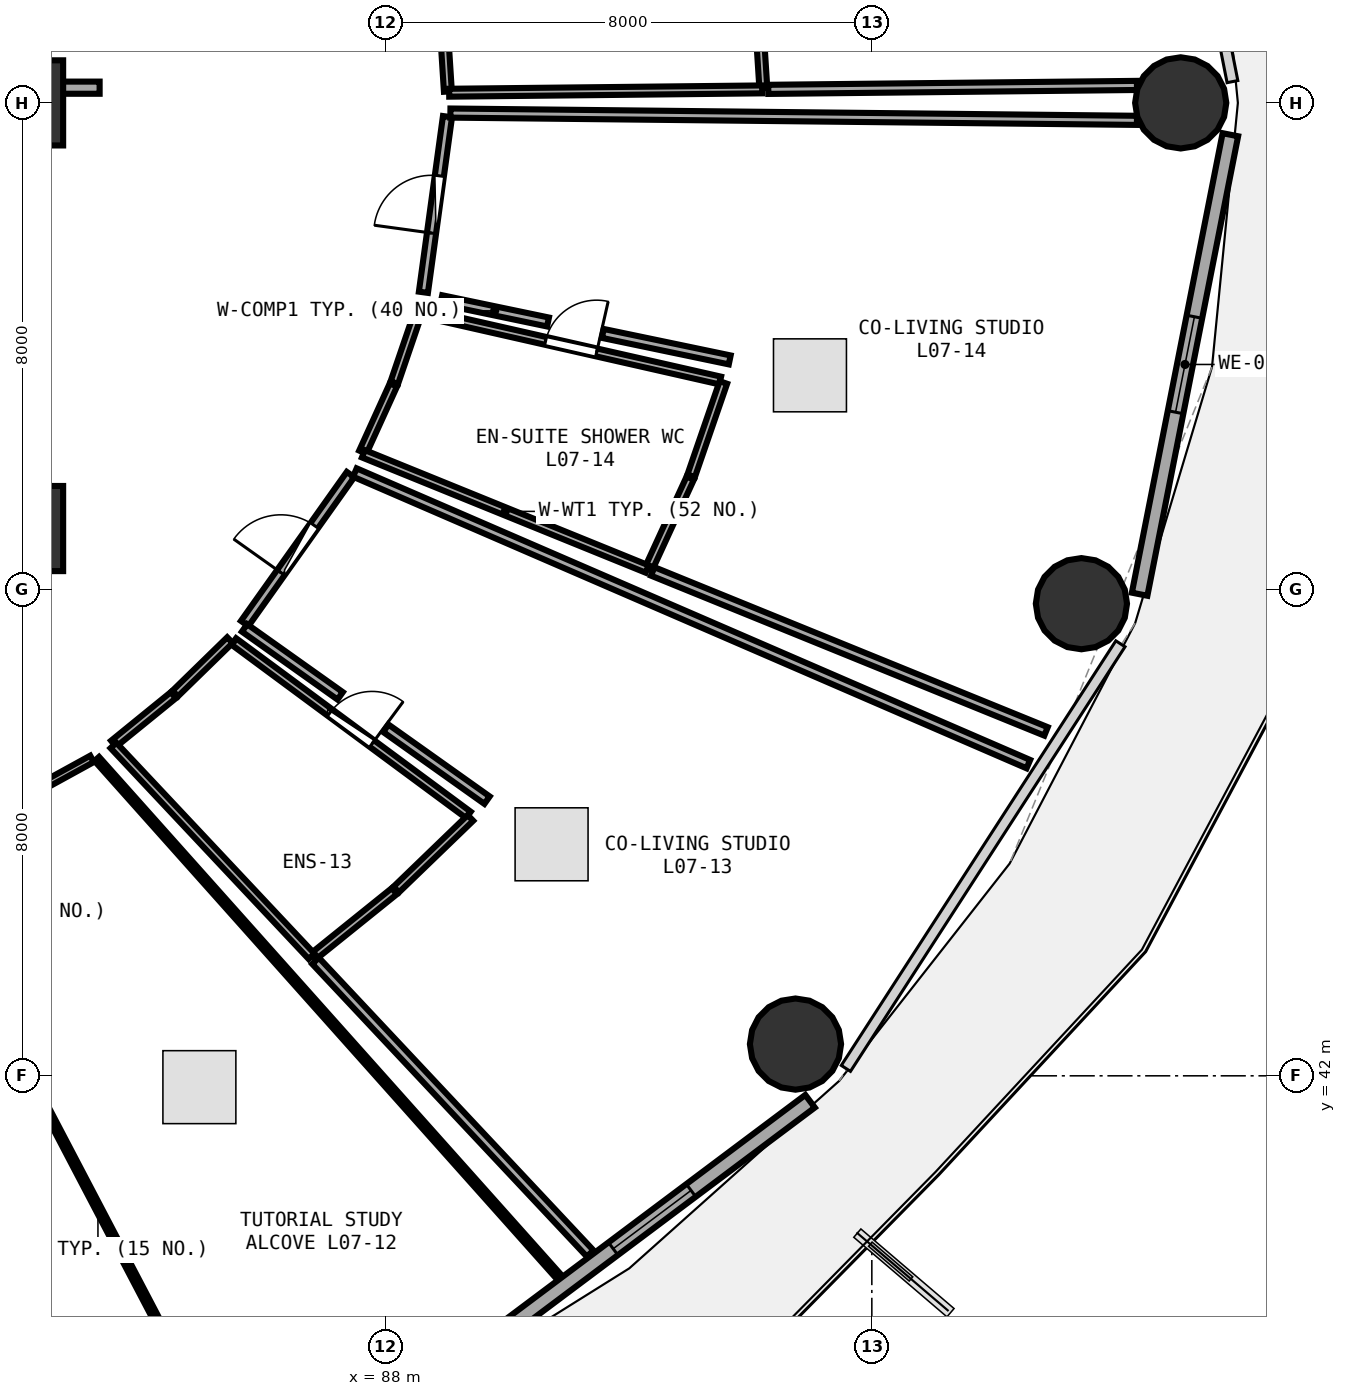
"""IFC4 building model, lengths in metres.
Left out: names, types, materials, properties, quantities, classifications, styles, units other than length and angle.
Written with IfcOpenShell. Run it as: python <this file> out.ifc"""

import sys

from ifc_helpers import new_model, si_unit, direction, frame, frame_2d, origin, origin_2d, place, context, subcontext, project, spatial, rectangle, circle, extrude, element, fill, save


model = new_model("IFC4")
c1 = context("Model", 3, precision=1e-05, world=origin(), true_north=direction((0.0, 1.0)))
c2 = subcontext(c1, "Body", "Model", "MODEL_VIEW")
j1 = project(units=[si_unit("LENGTHUNIT", "METRE"), si_unit("PLANEANGLEUNIT", "RADIAN")], contexts=[c1])
p1 = place(None, origin())
s1 = spatial("IfcSite", under=j1, at=p1, CompositionType="ELEMENT")
p2 = place(p1, origin())
s2 = spatial("IfcBuilding", under=s1, at=p2, CompositionType="ELEMENT")
p3 = place(p2, frame((0.0, 0.0, 30.0)))
s3 = spatial("IfcBuildingStorey", under=s2, at=p3, CompositionType="ELEMENT", Elevation=30.0)
for number, where, z_axis, x_axis in (
    (1, (82.0, 51.0, 0.0), (0.0, 0.0, 1.0), (1.0, 0.0, 0.0)),
    (2, (82.0, 58.0, 0.0), (0.0, 0.0, 1.0), (1.0, 0.0, 0.0)),
):
    element("IfcColumn", number, at=place(p3, frame(where, z_axis=z_axis, x_axis=x_axis)), inside=s3, PredefinedType="PILASTER", context=c2, shape_type="SweptSolid", body=[
        extrude(rectangle(XDim=1.4, YDim=1.4, at=origin_2d()), origin(), (0.0, 0.0, 1.0), 3.75),
    ])
for number, where, z_axis, x_axis in (
    (3, (101.08, 58.0, 0.0), (0.0, 0.0, 1.0), (1.0, 0.0, 0.0)),
    (4, (94.744, 42.522, 0.0), (0.0, 0.0, 1.0), (1.0, 0.0, 0.0)),
    (5, (99.447, 49.764, 0.0), (0.0, 0.0, 1.0), (1.0, 0.0, 0.0)),
):
    element("IfcColumn", number, at=place(p3, frame(where, z_axis=z_axis, x_axis=x_axis)), inside=s3, PredefinedType="COLUMN", context=c2, shape_type="SweptSolid", body=[
        extrude(circle(Radius=0.75, at=origin_2d()), origin(), (0.0, 0.0, 1.0), 3.75),
    ])
p4 = place(p3, frame((88.349, 36.611, 0.0), z_axis=(0.0, 0.0, 1.0), x_axis=(0.80030733173, 0.599590005569, 0.0)))
e6 = element("IfcWall", 6, at=p4, inside=s3, PredefinedType="SOLIDWALL", context=c2, shape_type="SweptSolid", body=[
    extrude(rectangle(XDim=8.291, YDim=0.26, at=frame_2d((4.145, 0.0))), origin(), (0.0, 0.0, 1.0), 3.475),
])
p5 = place(p4, frame((4.245, 0.0, 0.85)))
e7 = element("IfcOpeningElement", 7, at=p5, cuts=e6, PredefinedType="OPENING", context=c2, shape_type="SweptSolid", body=[
    extrude(rectangle(XDim=1.6, YDim=1.45, at=frame_2d((0.8, 0.725))), frame((0.0, 0.14, 0.0), z_axis=(0.0, -1.0, 0.0), x_axis=(1.0, 0.0, 0.0)), (0.0, 0.0, 1.0), 0.28),
])
p6 = place(p3, frame((100.404, 49.92, 0.0), z_axis=(0.0, 0.0, 1.0), x_axis=(0.193726159581, 0.98105564322, 0.0)))
e8 = element("IfcWall", 8, at=p6, inside=s3, PredefinedType="SOLIDWALL", context=c2, shape_type="SweptSolid", body=[
    extrude(rectangle(XDim=7.703, YDim=0.26, at=frame_2d((3.851, 0.0))), origin(), (0.0, 0.0, 1.0), 3.475),
])
p7 = place(p6, frame((3.051, 0.0, 0.85)))
e9 = element("IfcOpeningElement", 9, at=p7, cuts=e8, PredefinedType="OPENING", context=c2, shape_type="SweptSolid", body=[
    extrude(rectangle(XDim=1.6, YDim=1.45, at=frame_2d((0.8, 0.725))), frame((0.0, 0.14, 0.0), z_axis=(0.0, -1.0, 0.0), x_axis=(1.0, 0.0, 0.0)), (0.0, 0.0, 1.0), 0.28),
])
p8 = place(p3, frame((79.3, 58.25, 0.0), z_axis=(0.0, 0.0, 1.0), x_axis=(1.0, 0.0, 0.0)))
e10 = element("IfcWall", 10, at=p8, inside=s3, PredefinedType="SOLIDWALL", context=c2, shape_type="SweptSolid", body=[
    extrude(rectangle(XDim=4.0, YDim=0.2, at=frame_2d((2.0, 0.0))), origin(), (0.0, 0.0, 1.0), 2.775),
])
p9 = place(p8, frame((0.5, 0.0, 0.0)))
e11 = element("IfcOpeningElement", 11, at=p9, cuts=e10, PredefinedType="OPENING", context=c2, shape_type="SweptSolid", body=[
    extrude(rectangle(XDim=1.1, YDim=2.1, at=frame_2d((0.55, 1.05))), frame((0.0, 0.11, 0.0), z_axis=(0.0, -1.0, 0.0), x_axis=(1.0, 0.0, 0.0)), (0.0, 0.0, 1.0), 0.22),
])
p10 = place(p3, frame((80.299, 45.632, 0.0), z_axis=(0.0, 0.0, 1.0), x_axis=(0.876387079092, 0.481607399861, 0.0)))
e12 = element("IfcWall", 12, at=p10, inside=s3, PredefinedType="PARTITIONING", context=c2, shape_type="SweptSolid", body=[
    extrude(rectangle(XDim=3.281, YDim=0.12, at=frame_2d((1.641, 0.0))), origin(), (0.0, 0.0, 1.0), 2.875),
])
p11 = place(p10, frame((1.191, 0.0, 0.0)))
e13 = element("IfcOpeningElement", 13, at=p11, cuts=e12, PredefinedType="OPENING", context=c2, shape_type="SweptSolid", body=[
    extrude(rectangle(XDim=0.9, YDim=2.08, at=frame_2d((0.45, 1.04))), frame((0.0, 0.07, 0.0), z_axis=(0.0, -1.0, 0.0), x_axis=(1.0, 0.0, 0.0)), (0.0, 0.0, 1.0), 0.14),
])
p12 = place(p3, frame((85.506, 49.143, 0.0), z_axis=(0.0, 0.0, 1.0), x_axis=(0.80412644244, -0.594458295063, 0.0)))
e14 = element("IfcWall", 14, at=p12, inside=s3, PredefinedType="PLUMBINGWALL", context=c2, shape_type="SweptSolid", body=[
    extrude(rectangle(XDim=4.799, YDim=0.13, at=frame_2d((2.399, 0.0))), origin(), (0.0, 0.0, 1.0), 2.875),
])
p13 = place(p12, frame((1.969, 0.0, 0.0)))
e15 = element("IfcOpeningElement", 15, at=p13, cuts=e14, PredefinedType="OPENING", context=c2, shape_type="SweptSolid", body=[
    extrude(rectangle(XDim=0.86, YDim=2.05, at=frame_2d((0.43, 1.025))), frame((0.0, 0.075, 0.0), z_axis=(0.0, -1.0, 0.0), x_axis=(1.0, 0.0, 0.0)), (0.0, 0.0, 1.0), 0.15),
])
p14 = place(p3, frame((85.686, 49.438, 0.0), z_axis=(0.0, 0.0, 1.0), x_axis=(0.579107689823, 0.815251055557, 0.0)))
e16 = element("IfcWall", 16, at=p14, inside=s3, PredefinedType="PARTITIONING", context=c2, shape_type="SweptSolid", body=[
    extrude(rectangle(XDim=3.005, YDim=0.15, at=frame_2d((1.503, 0.0))), origin(), (0.0, 0.0, 1.0), 2.875),
])
p15 = place(p14, frame((1.028, 0.0, 0.0)))
e17 = element("IfcOpeningElement", 17, at=p15, cuts=e16, PredefinedType="OPENING", context=c2, shape_type="SweptSolid", body=[
    extrude(rectangle(XDim=0.95, YDim=2.08, at=frame_2d((0.475, 1.04))), frame((0.0, 0.085, 0.0), z_axis=(0.0, -1.0, 0.0), x_axis=(1.0, 0.0, 0.0)), (0.0, 0.0, 1.0), 0.17),
])
p16 = place(p3, frame((88.603, 54.548, 0.0), z_axis=(0.0, 0.0, 1.0), x_axis=(0.975187669184, -0.221379786503, 0.0)))
e18 = element("IfcWall", 18, at=p16, inside=s3, PredefinedType="PLUMBINGWALL", context=c2, shape_type="SweptSolid", body=[
    extrude(rectangle(XDim=5.029, YDim=0.13, at=frame_2d((2.514, 0.0))), origin(), (0.0, 0.0, 1.0), 3.175),
])
p17 = place(p16, frame((2.084, 0.0, 0.0)))
e19 = element("IfcOpeningElement", 19, at=p17, cuts=e18, PredefinedType="OPENING", context=c2, shape_type="SweptSolid", body=[
    extrude(rectangle(XDim=0.86, YDim=2.05, at=frame_2d((0.43, 1.025))), frame((0.0, 0.075, 0.0), z_axis=(0.0, -1.0, 0.0), x_axis=(1.0, 0.0, 0.0)), (0.0, 0.0, 1.0), 0.15),
])
p18 = place(p3, frame((88.625, 54.885, 0.0), z_axis=(0.0, 0.0, 1.0), x_axis=(0.135838186105, 0.990731036758, 0.0)))
e20 = element("IfcWall", 20, at=p18, inside=s3, PredefinedType="PARTITIONING", context=c2, shape_type="SweptSolid", body=[
    extrude(rectangle(XDim=2.915, YDim=0.15, at=frame_2d((1.458, 0.0))), origin(), (0.0, 0.0, 1.0), 3.48),
])
p19 = place(p18, frame((0.983, 0.0, 0.0)))
e21 = element("IfcOpeningElement", 21, at=p19, cuts=e20, PredefinedType="OPENING", context=c2, shape_type="SweptSolid", body=[
    extrude(rectangle(XDim=0.95, YDim=2.08, at=frame_2d((0.475, 1.04))), frame((0.0, 0.085, 0.0), z_axis=(0.0, -1.0, 0.0), x_axis=(1.0, 0.0, 0.0)), (0.0, 0.0, 1.0), 0.17),
])
p20 = place(p3, frame((89.028, 58.187, 0.0), z_axis=(0.0, 0.0, 1.0), x_axis=(-0.063661240763, 0.99797156594, 0.0)))
e22 = element("IfcWall", 22, at=p20, inside=s3, PredefinedType="PLUMBINGWALL", context=c2, shape_type="SweptSolid", body=[
    extrude(rectangle(XDim=1.197, YDim=0.13, at=frame_2d((0.598, 0.0))), origin(), (0.0, 0.0, 1.0), 2.875),
])
p21 = place(p3, frame((94.113, 59.845, 0.0), z_axis=(0.0, 0.0, 1.0), x_axis=(0.06383542257, -0.997960439509, 0.0)))
e23 = element("IfcWall", 23, at=p21, inside=s3, PredefinedType="PLUMBINGWALL", context=c2, shape_type="SweptSolid", body=[
    extrude(rectangle(XDim=1.606, YDim=0.13, at=frame_2d((0.803, 0.0))), origin(), (0.0, 0.0, 1.0), 3.48),
])
p22 = place(p3, frame((94.197, 58.222, 0.0), z_axis=(0.0, 0.0, 1.0), x_axis=(-0.999944081579, -0.010575146078, 0.0)))
e24 = element("IfcWall", 24, at=p22, inside=s3, PredefinedType="PLUMBINGWALL", context=c2, shape_type="SweptSolid", body=[
    extrude(rectangle(XDim=5.148, YDim=0.13, at=frame_2d((2.574, 0.0))), origin(), (0.0, 0.0, 1.0), 2.875),
])
p23 = place(p3, frame((100.36, 58.287, 0.0), z_axis=(0.0, 0.0, 1.0), x_axis=(-0.999943071294, -0.010670246996, 0.0)))
e25 = element("IfcWall", 25, at=p23, inside=s3, PredefinedType="PARTITIONING", context=c2, shape_type="SweptSolid", body=[
    extrude(rectangle(XDim=6.063, YDim=0.15, at=frame_2d((3.032, 0.0))), origin(), (0.0, 0.0, 1.0), 3.235),
])
p24 = place(p3, frame((83.254, 47.211, 0.0), z_axis=(0.0, 0.0, 1.0), x_axis=(0.66580890104, -0.746122313897, 0.0)))
e26 = element("IfcWall", 26, at=p24, inside=s3, PredefinedType="PARTITIONING", context=c2, shape_type="SweptSolid", body=[
    extrude(rectangle(XDim=11.399, YDim=0.1, at=frame_2d((5.7, 0.0))), origin(), (0.0, 0.0, 1.0), 2.875),
])
p25 = place(p3, frame((85.401, 35.769, 0.0), z_axis=(0.0, 0.0, 1.0), x_axis=(-0.464308397246, 0.885673592384, 0.0)))
e27 = element("IfcWall", 27, at=p25, inside=s3, PredefinedType="PARTITIONING", context=c2, shape_type="SweptSolid", body=[
    extrude(rectangle(XDim=9.17, YDim=0.1, at=frame_2d((4.585, 0.0))), origin(), (0.0, 0.0, 1.0), 2.875),
])
p26 = place(p3, frame((83.53, 47.461, 0.0), z_axis=(0.0, 0.0, 1.0), x_axis=(0.77596084644, 0.63078107517, 0.0)))
e28 = element("IfcWall", 28, at=p26, inside=s3, PredefinedType="PLUMBINGWALL", context=c2, shape_type="SweptSolid", body=[
    extrude(rectangle(XDim=1.268, YDim=0.13, at=frame_2d((0.634, 0.0))), origin(), (0.0, 0.0, 1.0), 2.875),
])
p27 = place(p3, frame((84.543, 48.287, 0.0), z_axis=(0.0, 0.0, 1.0), x_axis=(0.715980731769, 0.698120041064, 0.0)))
e29 = element("IfcWall", 29, at=p27, inside=s3, PredefinedType="PLUMBINGWALL", context=c2, shape_type="SweptSolid", body=[
    extrude(rectangle(XDim=1.258, YDim=0.13, at=frame_2d((0.629, 0.0))), origin(), (0.0, 0.0, 1.0), 2.875),
])
p28 = place(p3, frame((89.399, 46.241, 0.0), z_axis=(0.0, 0.0, 1.0), x_axis=(-0.719664402118, -0.694322078234, 0.0)))
e30 = element("IfcWall", 30, at=p28, inside=s3, PredefinedType="PLUMBINGWALL", context=c2, shape_type="SweptSolid", body=[
    extrude(rectangle(XDim=1.696, YDim=0.13, at=frame_2d((0.848, 0.0))), origin(), (0.0, 0.0, 1.0), 2.875),
])
p29 = place(p3, frame((88.148, 45.038, 0.0), z_axis=(0.0, 0.0, 1.0), x_axis=(-0.778806140639, -0.627264693174, 0.0)))
e31 = element("IfcWall", 31, at=p29, inside=s3, PredefinedType="PLUMBINGWALL", context=c2, shape_type="SweptSolid", body=[
    extrude(rectangle(XDim=1.713, YDim=0.13, at=frame_2d((0.856, 0.0))), origin(), (0.0, 0.0, 1.0), 3.175),
])
p30 = place(p3, frame((86.785, 43.966, 0.0), z_axis=(0.0, 0.0, 1.0), x_axis=(-0.68469858897, 0.728826345753, 0.0)))
e32 = element("IfcWall", 32, at=p30, inside=s3, PredefinedType="PLUMBINGWALL", context=c2, shape_type="SweptSolid", body=[
    extrude(rectangle(XDim=4.758, YDim=0.13, at=frame_2d((2.379, 0.0))), origin(), (0.0, 0.0, 1.0), 2.875),
])
p31 = place(p3, frame((87.498, 51.921, 0.0), z_axis=(0.0, 0.0, 1.0), x_axis=(0.917695041134, -0.397285554077, 0.0)))
e33 = element("IfcWall", 33, at=p31, inside=s3, PredefinedType="PARTITIONING", context=c2, shape_type="SweptSolid", body=[
    extrude(rectangle(XDim=12.07, YDim=0.15, at=frame_2d((6.035, 0.0))), origin(), (0.0, 0.0, 1.0), 2.875),
])
p32 = place(p3, frame((91.368, 39.078, 0.0), z_axis=(0.0, 0.0, 1.0), x_axis=(-0.684296653493, 0.729203736975, 0.0)))
e34 = element("IfcWall", 34, at=p32, inside=s3, PredefinedType="PARTITIONING", context=c2, shape_type="SweptSolid", body=[
    extrude(rectangle(XDim=6.6, YDim=0.15, at=frame_2d((3.3, 0.0))), origin(), (0.0, 0.0, 1.0), 2.875),
])
p33 = place(p3, frame((89.671, 46.533, 0.0), z_axis=(0.0, 0.0, 1.0), x_axis=(-0.815281399299, 0.579064970411, 0.0)))
e35 = element("IfcWall", 35, at=p33, inside=s3, PredefinedType="PARTITIONING", context=c2, shape_type="SweptSolid", body=[
    extrude(rectangle(XDim=2.042, YDim=0.15, at=frame_2d((1.021, 0.0))), origin(), (0.0, 0.0, 1.0), 3.48),
])
p34 = place(p3, frame((87.256, 48.249, 0.0), z_axis=(0.0, 0.0, 1.0), x_axis=(-0.815270043711, 0.579080957922, 0.0)))
e36 = element("IfcWall", 36, at=p34, inside=s3, PredefinedType="PARTITIONING", context=c2, shape_type="SweptSolid", body=[
    extrude(rectangle(XDim=1.929, YDim=0.15, at=frame_2d((0.964, 0.0))), origin(), (0.0, 0.0, 1.0), 3.235),
])
p35 = place(p3, frame((87.628, 52.255, 0.0), z_axis=(0.0, 0.0, 1.0), x_axis=(0.4138937247, 0.910325208183, 0.0)))
e37 = element("IfcWall", 37, at=p35, inside=s3, PredefinedType="PLUMBINGWALL", context=c2, shape_type="SweptSolid", body=[
    extrude(rectangle(XDim=1.216, YDim=0.13, at=frame_2d((0.608, 0.0))), origin(), (0.0, 0.0, 1.0), 3.48),
])
p36 = place(p3, frame((88.146, 53.399, 0.0), z_axis=(0.0, 0.0, 1.0), x_axis=(0.323735286305, 0.946147696928, 0.0)))
e38 = element("IfcWall", 38, at=p36, inside=s3, PredefinedType="PLUMBINGWALL", context=c2, shape_type="SweptSolid", body=[
    extrude(rectangle(XDim=1.208, YDim=0.13, at=frame_2d((0.604, 0.0))), origin(), (0.0, 0.0, 1.0), 3.48),
])
p37 = place(p3, frame((93.559, 53.402, 0.0), z_axis=(0.0, 0.0, 1.0), x_axis=(-0.326356647952, -0.945246707657, 0.0)))
e39 = element("IfcWall", 39, at=p37, inside=s3, PredefinedType="PLUMBINGWALL", context=c2, shape_type="SweptSolid", body=[
    extrude(rectangle(XDim=1.624, YDim=0.13, at=frame_2d((0.812, 0.0))), origin(), (0.0, 0.0, 1.0), 3.48),
])
p38 = place(p3, frame((93.014, 51.83, 0.0), z_axis=(0.0, 0.0, 1.0), x_axis=(-0.41762687648, -0.908618617486, 0.0)))
e40 = element("IfcWall", 40, at=p38, inside=s3, PredefinedType="PLUMBINGWALL", context=c2, shape_type="SweptSolid", body=[
    extrude(rectangle(XDim=1.634, YDim=0.13, at=frame_2d((0.817, 0.0))), origin(), (0.0, 0.0, 1.0), 2.875),
])
p39 = place(p3, frame((92.304, 50.334, 0.0), z_axis=(0.0, 0.0, 1.0), x_axis=(-0.926504606816, 0.376283421835, 0.0)))
e41 = element("IfcWall", 41, at=p39, inside=s3, PredefinedType="PLUMBINGWALL", context=c2, shape_type="SweptSolid", body=[
    extrude(rectangle(XDim=5.036, YDim=0.13, at=frame_2d((2.518, 0.0))), origin(), (0.0, 0.0, 1.0), 2.875),
])
p40 = place(p3, frame((89.069, 57.833, 0.0), z_axis=(0.0, 0.0, 1.0), x_axis=(0.999943877154, -0.010594458135, 0.0)))
e42 = element("IfcWall", 42, at=p40, inside=s3, PredefinedType="PARTITIONING", context=c2, shape_type="SweptSolid", body=[
    extrude(rectangle(XDim=11.292, YDim=0.15, at=frame_2d((5.646, 0.0))), origin(), (0.0, 0.0, 1.0), 2.875),
])
p41 = place(p3, frame((98.865, 47.664, 0.0), z_axis=(0.0, 0.0, 1.0), x_axis=(-0.926325178802, 0.376724917038, 0.0)))
e43 = element("IfcWall", 43, at=p41, inside=s3, PredefinedType="PARTITIONING", context=c2, shape_type="SweptSolid", body=[
    extrude(rectangle(XDim=6.983, YDim=0.15, at=frame_2d((3.492, 0.0))), origin(), (0.0, 0.0, 1.0), 2.875),
])
p42 = place(p3, frame((93.663, 53.773, 0.0), z_axis=(0.0, 0.0, 1.0), x_axis=(-0.978922282622, 0.204233113343, 0.0)))
e44 = element("IfcWall", 44, at=p42, inside=s3, PredefinedType="PARTITIONING", context=c2, shape_type="SweptSolid", body=[
    extrude(rectangle(XDim=2.133, YDim=0.15, at=frame_2d((1.066, 0.0))), origin(), (0.0, 0.0, 1.0), 3.175),
])
p43 = place(p3, frame((90.675, 54.397, 0.0), z_axis=(0.0, 0.0, 1.0), x_axis=(-0.978929424395, 0.204198878681, 0.0)))
e45 = element("IfcWall", 45, at=p43, inside=s3, PredefinedType="PARTITIONING", context=c2, shape_type="SweptSolid", body=[
    extrude(rectangle(XDim=1.793, YDim=0.15, at=frame_2d((0.897, 0.0))), origin(), (0.0, 0.0, 1.0), 3.235),
])
p44 = place(p5, origin())
e46 = element("IfcWindow", 46, at=p44, inside=s3, PartitioningType="SINGLE_PANEL", PredefinedType="WINDOW", context=c2, shape_type="SweptSolid", body=[
    extrude(rectangle(XDim=1.6, YDim=1.45, at=frame_2d((0.8, 0.725))), frame((0.0, 0.03, 0.0), z_axis=(0.0, -1.0, 0.0), x_axis=(1.0, 0.0, 0.0)), (0.0, 0.0, 1.0), 0.06),
])
fill(e7, e46)
p45 = place(p7, origin())
e47 = element("IfcWindow", 47, at=p45, inside=s3, PartitioningType="SINGLE_PANEL", PredefinedType="WINDOW", context=c2, shape_type="SweptSolid", body=[
    extrude(rectangle(XDim=1.6, YDim=1.45, at=frame_2d((0.8, 0.725))), frame((0.0, 0.03, 0.0), z_axis=(0.0, -1.0, 0.0), x_axis=(1.0, 0.0, 0.0)), (0.0, 0.0, 1.0), 0.06),
])
fill(e9, e47)
p46 = place(p13, origin())
e48 = element("IfcDoor", 48, at=p46, inside=s3, OperationType="SINGLE_SWING_RIGHT", PredefinedType="DOOR", context=c2, shape_type="SweptSolid", body=[
    extrude(rectangle(XDim=0.86, YDim=2.05, at=frame_2d((0.43, 1.025))), frame((0.0, 0.025, 0.0), z_axis=(0.0, -1.0, 0.0), x_axis=(1.0, 0.0, 0.0)), (0.0, 0.0, 1.0), 0.05),
])
fill(e15, e48)
p47 = place(p15, origin())
e49 = element("IfcDoor", 49, at=p47, inside=s3, OperationType="SINGLE_SWING_LEFT", PredefinedType="DOOR", context=c2, shape_type="SweptSolid", body=[
    extrude(rectangle(XDim=0.95, YDim=2.08, at=frame_2d((0.475, 1.04))), frame((0.0, 0.025, 0.0), z_axis=(0.0, -1.0, 0.0), x_axis=(1.0, 0.0, 0.0)), (0.0, 0.0, 1.0), 0.05),
])
fill(e17, e49)
p48 = place(p17, origin())
e50 = element("IfcDoor", 50, at=p48, inside=s3, OperationType="SINGLE_SWING_RIGHT", PredefinedType="DOOR", context=c2, shape_type="SweptSolid", body=[
    extrude(rectangle(XDim=0.86, YDim=2.05, at=frame_2d((0.43, 1.025))), frame((0.0, 0.025, 0.0), z_axis=(0.0, -1.0, 0.0), x_axis=(1.0, 0.0, 0.0)), (0.0, 0.0, 1.0), 0.05),
])
fill(e19, e50)
p49 = place(p19, origin())
e51 = element("IfcDoor", 51, at=p49, inside=s3, OperationType="SINGLE_SWING_LEFT", PredefinedType="DOOR", context=c2, shape_type="SweptSolid", body=[
    extrude(rectangle(XDim=0.95, YDim=2.08, at=frame_2d((0.475, 1.04))), frame((0.0, 0.025, 0.0), z_axis=(0.0, -1.0, 0.0), x_axis=(1.0, 0.0, 0.0)), (0.0, 0.0, 1.0), 0.05),
])
fill(e21, e51)
save(model, sys.argv[1])
